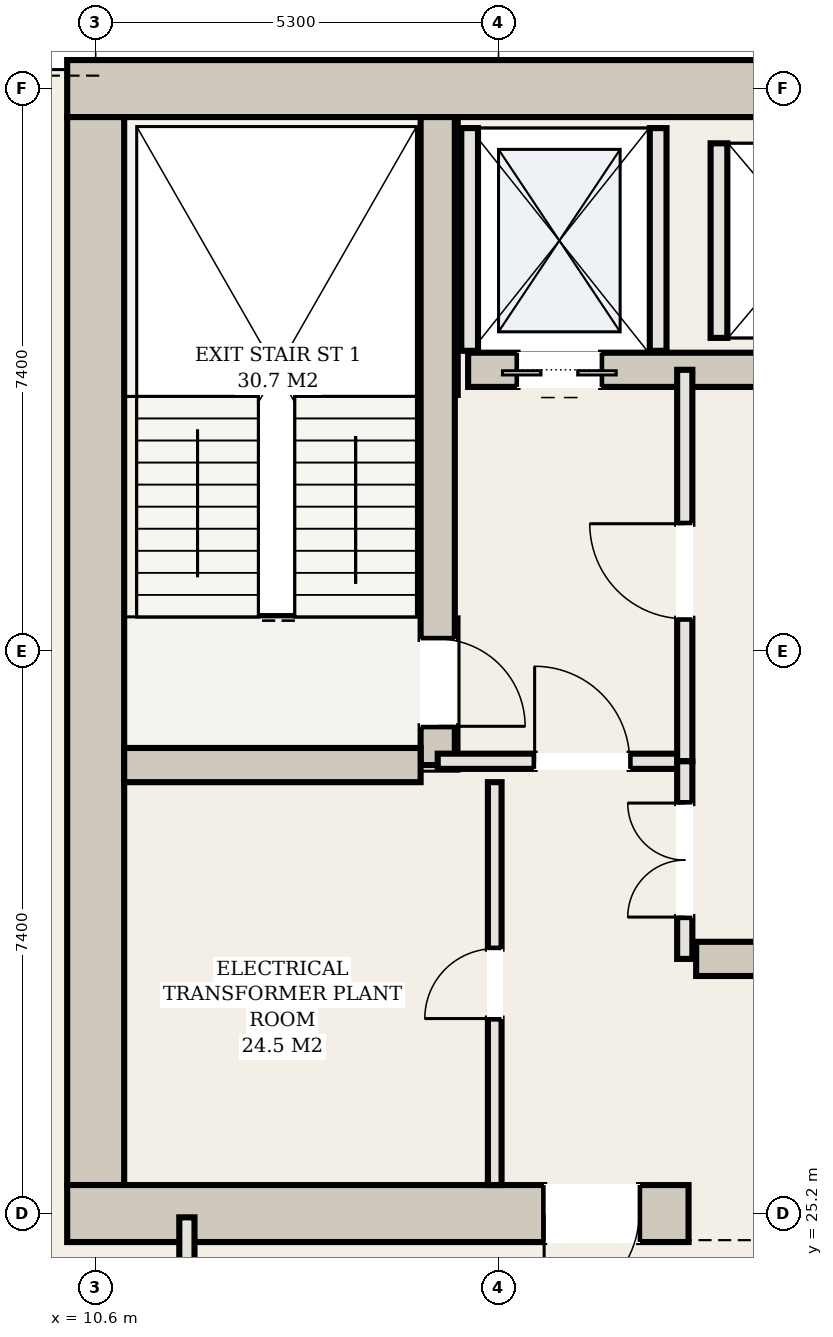
"""IFC4 building model, lengths in metres.
Left out: names, types, materials, properties, quantities, classifications, styles, units other than length and angle.
Written with IfcOpenShell. Run it as: python <this file> out.ifc"""

import sys

from ifc_helpers import new_model, si_unit, direction, frame, frame_2d, origin, place, context, subcontext, project, spatial, rectangle, extrude, element, fill, save


model = new_model("IFC4")
c1 = context("Model", 3, precision=1e-05, world=origin(), true_north=direction((0.0, 1.0)))
c2 = subcontext(c1, "Body", "Model", "MODEL_VIEW")
j1 = project(units=[si_unit("LENGTHUNIT", "METRE"), si_unit("PLANEANGLEUNIT", "RADIAN")], contexts=[c1])
p1 = place(None, origin())
s1 = spatial("IfcSite", under=j1, at=p1, CompositionType="ELEMENT")
p2 = place(p1, origin())
s2 = spatial("IfcBuilding", under=s1, at=p2, CompositionType="ELEMENT")
p3 = place(p2, frame((0.0, 0.0, 127.9)))
s3 = spatial("IfcBuildingStorey", under=s2, at=p3, CompositionType="ELEMENT", Elevation=127.9)
p4 = place(p3, frame((10.225, 40.0, 0.0), z_axis=(0.0, 0.0, 1.0), x_axis=(1.0, 0.0, 0.0)))
e1 = element("IfcWall", 1, at=p4, inside=s3, PredefinedType="SHEAR", context=c2, shape_type="SweptSolid", body=[
    extrude(rectangle(XDim=32.55, YDim=0.75, at=frame_2d((16.275, 0.0))), origin(), (0.0, 0.0, 1.0), 6.56),
])
p5 = place(p3, frame((10.6, 25.575, 0.0), z_axis=(0.0, 0.0, 1.0), x_axis=(0.0, 1.0, 0.0)))
e2 = element("IfcWall", 2, at=p5, inside=s3, PredefinedType="SHEAR", context=c2, shape_type="SweptSolid", body=[
    extrude(rectangle(XDim=14.05, YDim=0.75, at=frame_2d((7.025, 0.0))), origin(), (0.0, 0.0, 1.0), 6.56),
])
p6 = place(p3, frame((10.225, 25.2, 0.0), z_axis=(0.0, 0.0, 1.0), x_axis=(1.0, 0.0, 0.0)))
e3 = element("IfcWall", 3, at=p6, inside=s3, PredefinedType="SHEAR", context=c2, shape_type="SweptSolid", body=[
    extrude(rectangle(XDim=8.175, YDim=0.75, at=frame_2d((4.087, 0.0))), origin(), (0.0, 0.0, 1.0), 6.56),
])
p7 = place(p6, frame((6.275, 0.0, 0.0)))
e4 = element("IfcOpeningElement", 4, at=p7, cuts=e3, PredefinedType="OPENING", context=c2, shape_type="SweptSolid", body=[
    extrude(rectangle(XDim=1.25, YDim=2.2, at=frame_2d((0.625, 1.1))), frame((0.0, 0.385, 0.0), z_axis=(0.0, -1.0, 0.0), x_axis=(1.0, 0.0, 0.0)), (0.0, 0.0, 1.0), 0.77),
])
p8 = place(p3, frame((15.1, 31.1, 0.0), z_axis=(0.0, 0.0, 1.0), x_axis=(0.0, 1.0, 0.0)))
e5 = element("IfcWall", 5, at=p8, inside=s3, PredefinedType="SHEAR", context=c2, shape_type="SweptSolid", body=[
    extrude(rectangle(XDim=8.525, YDim=0.45, at=frame_2d((4.262, 0.0))), origin(), (0.0, 0.0, 1.0), 6.56),
])
p9 = place(p8, frame((0.51, 0.0, 0.0)))
e6 = element("IfcOpeningElement", 6, at=p9, cuts=e5, PredefinedType="OPENING", context=c2, shape_type="SweptSolid", body=[
    extrude(rectangle(XDim=1.15, YDim=2.2, at=frame_2d((0.575, 1.1))), frame((0.0, 0.235, 0.0), z_axis=(0.0, -1.0, 0.0), x_axis=(1.0, 0.0, 0.0)), (0.0, 0.0, 1.0), 0.47),
])
p10 = place(p3, frame((10.975, 31.1, 0.0), z_axis=(0.0, 0.0, 1.0), x_axis=(1.0, 0.0, 0.0)))
e7 = element("IfcWall", 7, at=p10, inside=s3, PredefinedType="SHEAR", context=c2, shape_type="SweptSolid", body=[
    extrude(rectangle(XDim=3.9, YDim=0.45, at=frame_2d((1.95, 0.0))), origin(), (0.0, 0.0, 1.0), 6.56),
])
p11 = place(p3, frame((15.5, 36.3, 0.0), z_axis=(0.0, 0.0, 1.0), x_axis=(1.0, 0.0, 0.0)))
e8 = element("IfcWall", 8, at=p11, inside=s3, PredefinedType="SHEAR", context=c2, shape_type="SweptSolid", body=[
    extrude(rectangle(XDim=22.0, YDim=0.45, at=frame_2d((11.0, 0.0))), origin(), (0.0, 0.0, 1.0), 6.56),
])
p12 = place(p11, frame((0.65, 0.0, 0.0)))
e9 = element("IfcOpeningElement", 9, at=p12, cuts=e8, PredefinedType="OPENING", context=c2, shape_type="SweptSolid", body=[
    extrude(rectangle(XDim=1.1, YDim=2.15, at=frame_2d((0.55, 1.075))), frame((0.0, 0.235, 0.0), z_axis=(0.0, -1.0, 0.0), x_axis=(1.0, 0.0, 0.0)), (0.0, 0.0, 1.0), 0.47),
])
p13 = place(p11, frame((20.25, 0.0, 0.0)))
e10 = element("IfcOpeningElement", 10, at=p13, cuts=e8, PredefinedType="OPENING", context=c2, shape_type="SweptSolid", body=[
    extrude(rectangle(XDim=1.1, YDim=2.15, at=frame_2d((0.55, 1.075))), frame((0.0, 0.235, 0.0), z_axis=(0.0, -1.0, 0.0), x_axis=(1.0, 0.0, 0.0)), (0.0, 0.0, 1.0), 0.47),
])
p14 = place(p11, frame((17.05, 0.0, 0.0)))
e11 = element("IfcOpeningElement", 11, at=p14, cuts=e8, PredefinedType="OPENING", context=c2, shape_type="SweptSolid", body=[
    extrude(rectangle(XDim=1.3, YDim=2.2, at=frame_2d((0.65, 1.1))), frame((0.0, 0.235, 0.0), z_axis=(0.0, -1.0, 0.0), x_axis=(1.0, 0.0, 0.0)), (0.0, 0.0, 1.0), 0.47),
])
p15 = place(p3, frame((18.5, 28.55, 0.0), z_axis=(0.0, 0.0, 1.0), x_axis=(1.0, 0.0, 0.0)))
e12 = element("IfcWall", 12, at=p15, inside=s3, PredefinedType="SHEAR", context=c2, shape_type="SweptSolid", body=[
    extrude(rectangle(XDim=16.0, YDim=0.45, at=frame_2d((8.0, 0.0))), origin(), (0.0, 0.0, 1.0), 6.56),
])
p16 = place(p15, frame((8.95, 0.0, 0.0)))
e13 = element("IfcOpeningElement", 13, at=p16, cuts=e12, PredefinedType="OPENING", context=c2, shape_type="SweptSolid", body=[
    extrude(rectangle(XDim=1.1, YDim=2.15, at=frame_2d((0.55, 1.075))), frame((0.0, 0.235, 0.0), z_axis=(0.0, -1.0, 0.0), x_axis=(1.0, 0.0, 0.0)), (0.0, 0.0, 1.0), 0.47),
])
p17 = place(p15, frame((11.55, 0.0, 0.0)))
e14 = element("IfcOpeningElement", 14, at=p17, cuts=e12, PredefinedType="OPENING", context=c2, shape_type="SweptSolid", body=[
    extrude(rectangle(XDim=1.1, YDim=2.15, at=frame_2d((0.55, 1.075))), frame((0.0, 0.235, 0.0), z_axis=(0.0, -1.0, 0.0), x_axis=(1.0, 0.0, 0.0)), (0.0, 0.0, 1.0), 0.47),
])
p18 = place(p15, frame((14.15, 0.0, 0.0)))
e15 = element("IfcOpeningElement", 15, at=p18, cuts=e12, PredefinedType="OPENING", context=c2, shape_type="SweptSolid", body=[
    extrude(rectangle(XDim=1.1, YDim=2.15, at=frame_2d((0.55, 1.075))), frame((0.0, 0.235, 0.0), z_axis=(0.0, -1.0, 0.0), x_axis=(1.0, 0.0, 0.0)), (0.0, 0.0, 1.0), 0.47),
])
for number, where, z_axis, x_axis in (
    (16, (15.52, 36.55, 0.0), (0.0, 0.0, 1.0), (0.0, 1.0, 0.0)),
    (17, (18.0, 36.55, 0.0), (0.0, 0.0, 1.0), (0.0, 1.0, 0.0)),
):
    element("IfcWall", number, at=place(p3, frame(where, z_axis=z_axis, x_axis=x_axis)), inside=s3, PredefinedType="SOLIDWALL", context=c2, shape_type="SweptSolid", body=[
        extrude(rectangle(XDim=2.93, YDim=0.22, at=frame_2d((1.465, 0.0))), origin(), (0.0, 0.0, 1.0), 6.56),
    ])
p19 = place(p3, frame((18.8, 36.72, 0.0), z_axis=(0.0, 0.0, 1.0), x_axis=(0.0, 1.0, 0.0)))
e18 = element("IfcWall", 18, at=p19, inside=s3, PredefinedType="SOLIDWALL", context=c2, shape_type="SweptSolid", body=[
    extrude(rectangle(XDim=2.56, YDim=0.22, at=frame_2d((1.28, 0.0))), origin(), (0.0, 0.0, 1.0), 6.56),
])
p20 = place(p3, frame((15.1, 31.15, 0.0), z_axis=(0.0, 0.0, 1.0), x_axis=(1.0, 0.0, 0.0)))
e19 = element("IfcWall", 19, at=p20, inside=s3, PredefinedType="PARTITIONING", context=c2, shape_type="SweptSolid", body=[
    extrude(rectangle(XDim=3.25, YDim=0.2, at=frame_2d((1.625, 0.0))), origin(), (0.0, 0.0, 1.0), 6.56),
])
p21 = place(p20, frame((1.275, 0.0, 0.0)))
e20 = element("IfcOpeningElement", 20, at=p21, cuts=e19, PredefinedType="OPENING", context=c2, shape_type="SweptSolid", body=[
    extrude(rectangle(XDim=1.25, YDim=2.2, at=frame_2d((0.625, 1.1))), frame((0.0, 0.11, 0.0), z_axis=(0.0, -1.0, 0.0), x_axis=(1.0, 0.0, 0.0)), (0.0, 0.0, 1.0), 0.22),
])
p22 = place(p3, frame((18.35, 31.15, 0.0), z_axis=(0.0, 0.0, 1.0), x_axis=(0.0, 1.0, 0.0)))
e21 = element("IfcWall", 21, at=p22, inside=s3, PredefinedType="PARTITIONING", context=c2, shape_type="SweptSolid", body=[
    extrude(rectangle(XDim=5.15, YDim=0.2, at=frame_2d((2.575, 0.0))), origin(), (0.0, 0.0, 1.0), 6.56),
])
p23 = place(p22, frame((1.875, 0.0, 0.0)))
e22 = element("IfcOpeningElement", 22, at=p23, cuts=e21, PredefinedType="OPENING", context=c2, shape_type="SweptSolid", body=[
    extrude(rectangle(XDim=1.25, YDim=2.2, at=frame_2d((0.625, 1.1))), frame((0.0, 0.11, 0.0), z_axis=(0.0, -1.0, 0.0), x_axis=(1.0, 0.0, 0.0)), (0.0, 0.0, 1.0), 0.22),
])
p24 = place(p3, frame((15.85, 25.575, 0.0), z_axis=(0.0, 0.0, 1.0), x_axis=(0.0, 1.0, 0.0)))
e23 = element("IfcWall", 23, at=p24, inside=s3, PredefinedType="PARTITIONING", context=c2, shape_type="SweptSolid", body=[
    extrude(rectangle(XDim=5.3, YDim=0.18, at=frame_2d((2.65, 0.0))), origin(), (0.0, 0.0, 1.0), 5.055),
])
p25 = place(p24, frame((2.19, 0.0, 0.0)))
e24 = element("IfcOpeningElement", 24, at=p25, cuts=e23, PredefinedType="OPENING", context=c2, shape_type="SweptSolid", body=[
    extrude(rectangle(XDim=0.92, YDim=2.15, at=frame_2d((0.46, 1.075))), frame((0.0, 0.1, 0.0), z_axis=(0.0, -1.0, 0.0), x_axis=(1.0, 0.0, 0.0)), (0.0, 0.0, 1.0), 0.2),
])
p26 = place(p3, frame((18.35, 28.55, 0.0), z_axis=(0.0, 0.0, 1.0), x_axis=(0.0, 1.0, 0.0)))
e25 = element("IfcWall", 25, at=p26, inside=s3, PredefinedType="PARTITIONING", context=c2, shape_type="SweptSolid", body=[
    extrude(rectangle(XDim=2.6, YDim=0.2, at=frame_2d((1.3, 0.0))), origin(), (0.0, 0.0, 1.0), 6.56),
])
p27 = place(p26, frame((0.55, 0.0, 0.0)))
e26 = element("IfcOpeningElement", 26, at=p27, cuts=e25, PredefinedType="OPENING", context=c2, shape_type="SweptSolid", body=[
    extrude(rectangle(XDim=1.5, YDim=2.25, at=frame_2d((0.75, 1.125))), frame((0.0, 0.11, 0.0), z_axis=(0.0, -1.0, 0.0), x_axis=(1.0, 0.0, 0.0)), (0.0, 0.0, 1.0), 0.22),
])
p28 = place(p3, frame((11.8, 22.4, 0.0), z_axis=(0.0, 0.0, 1.0), x_axis=(0.0, 1.0, 0.0)))
e27 = element("IfcWall", 27, at=p28, inside=s3, PredefinedType="PARTITIONING", context=c2, shape_type="SweptSolid", body=[
    extrude(rectangle(XDim=2.75, YDim=0.2, at=frame_2d((1.375, 0.0))), origin(), (0.0, 0.0, 1.0), 6.56),
])
p29 = place(p12, frame((1.1, 0.0, 0.0), z_axis=(0.0, 0.0, 1.0), x_axis=(-1.0, 0.0, 0.0)))
e28 = element("IfcDoor", 28, at=p29, inside=s3, OperationType="DOUBLE_DOOR_SLIDING", PredefinedType="DOOR", context=c2, shape_type="SweptSolid", body=[
    extrude(rectangle(XDim=1.1, YDim=2.15, at=frame_2d((0.55, 1.075))), frame((0.0, 0.025, 0.0), z_axis=(0.0, -1.0, 0.0), x_axis=(1.0, 0.0, 0.0)), (0.0, 0.0, 1.0), 0.05),
])
fill(e9, e28)
p30 = place(p7, frame((1.25, 0.0, 0.0), z_axis=(0.0, 0.0, 1.0), x_axis=(-1.0, 0.0, 0.0)))
e29 = element("IfcDoor", 29, at=p30, inside=s3, OperationType="SINGLE_SWING_RIGHT", PredefinedType="DOOR", context=c2, shape_type="SweptSolid", body=[
    extrude(rectangle(XDim=1.25, YDim=2.2, at=frame_2d((0.625, 1.1))), frame((0.0, 0.025, 0.0), z_axis=(0.0, -1.0, 0.0), x_axis=(1.0, 0.0, 0.0)), (0.0, 0.0, 1.0), 0.05),
])
fill(e4, e29)
p31 = place(p21, origin())
e30 = element("IfcDoor", 30, at=p31, inside=s3, OperationType="SINGLE_SWING_LEFT", PredefinedType="DOOR", context=c2, shape_type="SweptSolid", body=[
    extrude(rectangle(XDim=1.25, YDim=2.2, at=frame_2d((0.625, 1.1))), frame((0.0, 0.025, 0.0), z_axis=(0.0, -1.0, 0.0), x_axis=(1.0, 0.0, 0.0)), (0.0, 0.0, 1.0), 0.05),
])
fill(e20, e30)
p32 = place(p23, origin())
e31 = element("IfcDoor", 31, at=p32, inside=s3, OperationType="SINGLE_SWING_RIGHT", PredefinedType="DOOR", context=c2, shape_type="SweptSolid", body=[
    extrude(rectangle(XDim=1.25, YDim=2.2, at=frame_2d((0.625, 1.1))), frame((0.0, 0.025, 0.0), z_axis=(0.0, -1.0, 0.0), x_axis=(1.0, 0.0, 0.0)), (0.0, 0.0, 1.0), 0.05),
])
fill(e22, e31)
p33 = place(p9, frame((1.15, 0.0, 0.0), z_axis=(0.0, 0.0, 1.0), x_axis=(-1.0, 0.0, 0.0)))
e32 = element("IfcDoor", 32, at=p33, inside=s3, OperationType="SINGLE_SWING_RIGHT", PredefinedType="DOOR", context=c2, shape_type="SweptSolid", body=[
    extrude(rectangle(XDim=1.15, YDim=2.2, at=frame_2d((0.575, 1.1))), frame((0.0, 0.025, 0.0), z_axis=(0.0, -1.0, 0.0), x_axis=(1.0, 0.0, 0.0)), (0.0, 0.0, 1.0), 0.05),
])
fill(e6, e32)
p34 = place(p25, origin())
e33 = element("IfcDoor", 33, at=p34, inside=s3, OperationType="SINGLE_SWING_LEFT", PredefinedType="DOOR", context=c2, shape_type="SweptSolid", body=[
    extrude(rectangle(XDim=0.92, YDim=2.15, at=frame_2d((0.46, 1.075))), frame((0.0, 0.025, 0.0), z_axis=(0.0, -1.0, 0.0), x_axis=(1.0, 0.0, 0.0)), (0.0, 0.0, 1.0), 0.05),
])
fill(e24, e33)
p35 = place(p27, origin())
e34 = element("IfcDoor", 34, at=p35, inside=s3, OperationType="DOUBLE_DOOR_SINGLE_SWING", PredefinedType="DOOR", context=c2, shape_type="SweptSolid", body=[
    extrude(rectangle(XDim=1.5, YDim=2.25, at=frame_2d((0.75, 1.125))), frame((0.0, 0.025, 0.0), z_axis=(0.0, -1.0, 0.0), x_axis=(1.0, 0.0, 0.0)), (0.0, 0.0, 1.0), 0.05),
])
fill(e26, e34)
save(model, sys.argv[1])
